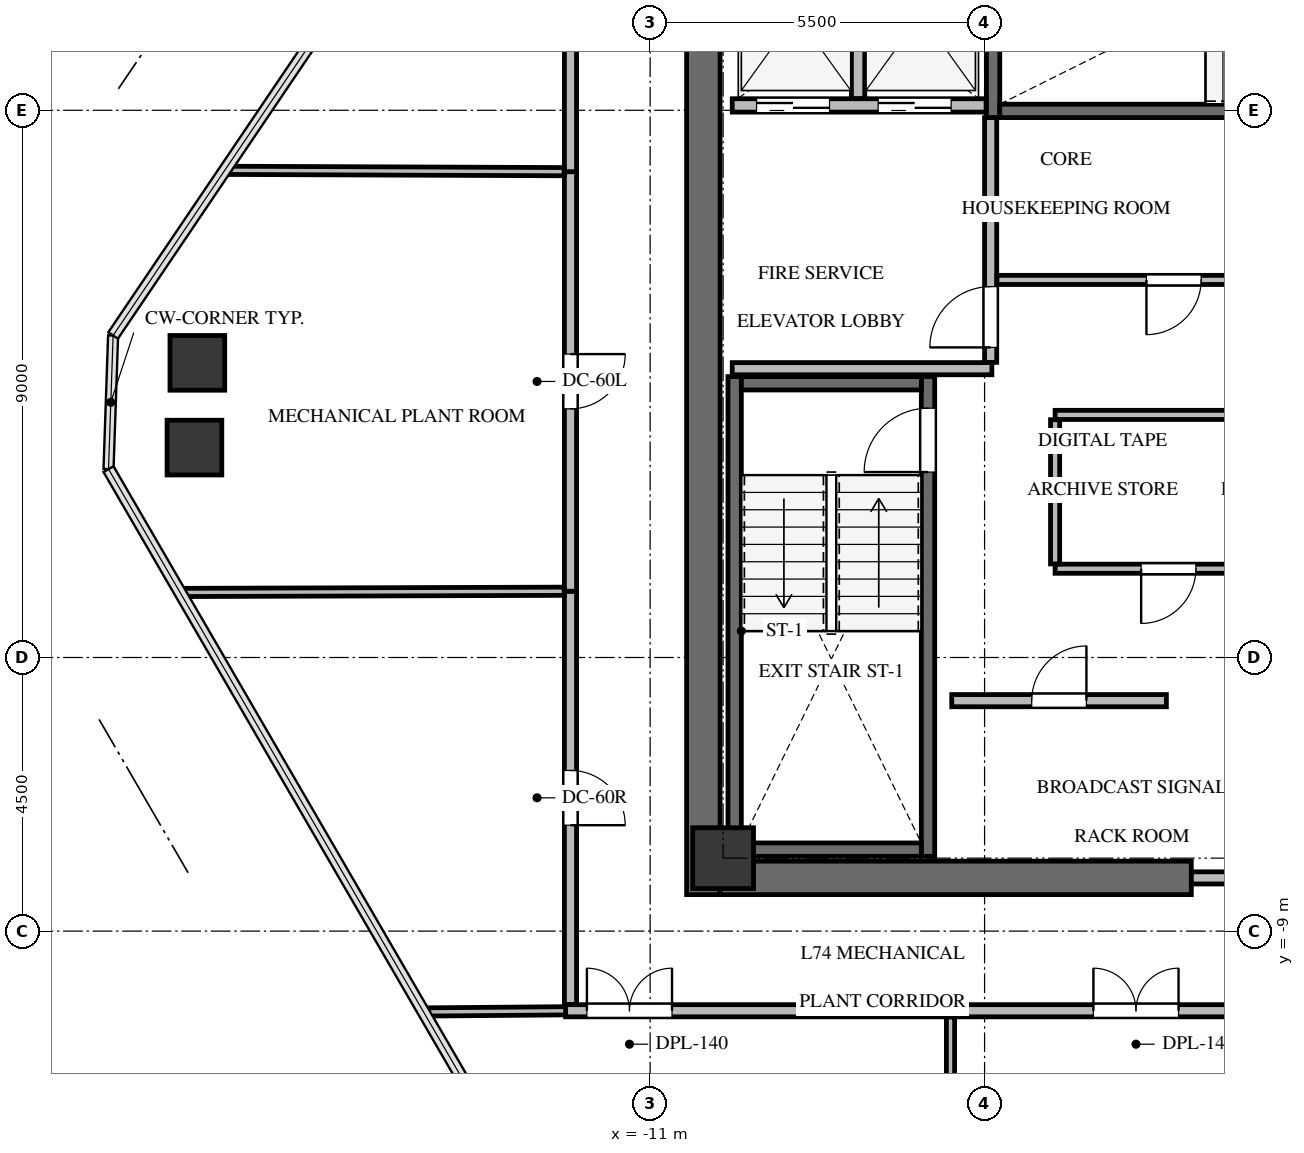
"""IFC4 building model, lengths in metres.
Left out: names, types, materials, properties, quantities, classifications, styles, units other than length and angle.
Written with IfcOpenShell. Run it as: python <this file> out.ifc"""

import sys

from ifc_helpers import new_model, si_unit, direction, frame, frame_2d, origin, origin_2d, place, context, subcontext, project, spatial, rectangle, extrude, source, transform, mapped, element, fill, save


model = new_model("IFC4")
c1 = context("Model", 3, precision=1e-05, world=origin(), true_north=direction((0.0, 1.0)))
c2 = subcontext(c1, "Body", "Model", "MODEL_VIEW")
j1 = project(units=[si_unit("LENGTHUNIT", "METRE"), si_unit("PLANEANGLEUNIT", "RADIAN")], contexts=[c1])
p1 = place(None, origin())
s1 = spatial("IfcSite", under=j1, at=p1, CompositionType="ELEMENT")
p2 = place(p1, origin())
s2 = spatial("IfcBuilding", under=s1, at=p2, CompositionType="ELEMENT")
p3 = place(p2, frame((0.0, 0.0, 264.9)))
s3 = spatial("IfcBuildingStorey", under=s2, at=p3, CompositionType="ELEMENT", Elevation=264.9)
p4 = place(p3, frame((-10.125, -8.4, 0.0), z_axis=(0.0, 0.0, 1.0), x_axis=(0.0, 1.0, 0.0)))
e1 = element("IfcWall", 1, at=p4, inside=s3, PredefinedType="SHEAR", context=c2, shape_type="SweptSolid", body=[
    extrude(rectangle(XDim=16.8, YDim=0.55, at=frame_2d((8.4, 0.0))), origin(), (0.0, 0.0, 1.0), 3.4),
])
p5 = place(p3, frame((-9.85, -8.125, 0.0), z_axis=(0.0, 0.0, 1.0), x_axis=(1.0, 0.0, 0.0)))
e2 = element("IfcWall", 2, at=p5, inside=s3, PredefinedType="SHEAR", context=c2, shape_type="SweptSolid", body=[
    extrude(rectangle(XDim=7.75, YDim=0.55, at=frame_2d((3.875, 0.0))), origin(), (0.0, 0.0, 1.0), 3.4),
])
p6 = place(p3, frame((-6.43, -7.77, -0.3), z_axis=(0.0, 0.0, 1.0), x_axis=(0.0, 1.0, 0.0)))
e3 = element("IfcWall", 3, at=p6, inside=s3, PredefinedType="SHEAR", context=c2, shape_type="SweptSolid", body=[
    extrude(rectangle(XDim=7.89, YDim=0.22, at=frame_2d((3.945, 0.0))), origin(), (0.0, 0.0, 1.0), 3.4),
])
p7 = place(p6, frame((6.32, 0.0, 0.0)))
e4 = element("IfcOpeningElement", 4, at=p7, cuts=e3, PredefinedType="OPENING", context=c2, shape_type="SweptSolid", body=[
    extrude(rectangle(XDim=1.05, YDim=2.15, at=frame_2d((0.525, 1.075))), frame((0.0, 0.12, 0.0), z_axis=(0.0, -1.0, 0.0), x_axis=(1.0, 0.0, 0.0)), (0.0, 0.0, 1.0), 0.24),
])
p8 = place(p3, frame((-9.61, 0.12, -0.3), z_axis=(0.0, 0.0, 1.0), x_axis=(0.0, -1.0, 0.0)))
e5 = element("IfcWall", 5, at=p8, inside=s3, PredefinedType="SHEAR", context=c2, shape_type="SweptSolid", body=[
    extrude(rectangle(XDim=7.89, YDim=0.22, at=frame_2d((3.945, 0.0))), origin(), (0.0, 0.0, 1.0), 3.4),
])
for number, where, z_axis, x_axis in (
    (6, (-9.5, -7.66, -0.3), (0.0, 0.0, 1.0), (1.0, 0.0, 0.0)),
    (7, (-6.54, 0.01, -0.3), (0.0, 0.0, 1.0), (-1.0, 0.0, 0.0)),
):
    element("IfcWall", number, at=place(p3, frame(where, z_axis=z_axis, x_axis=x_axis)), inside=s3, PredefinedType="SHEAR", context=c2, shape_type="SweptSolid", body=[
        extrude(rectangle(XDim=2.96, YDim=0.22, at=frame_2d((1.48, 0.0))), origin(), (0.0, 0.0, 1.0), 3.4),
    ])
p9 = place(p3, frame((-5.36, 7.78, -0.3), z_axis=(0.0, 0.0, 1.0), x_axis=(0.0, -1.0, 0.0)))
e8 = element("IfcWall", 8, at=p9, inside=s3, PredefinedType="SHEAR", context=c2, shape_type="SweptSolid", body=[
    extrude(rectangle(XDim=3.4, YDim=0.22, at=frame_2d((1.7, 0.0))), origin(), (0.0, 0.0, 1.0), 3.4),
])
p10 = place(p3, frame((-5.25, 4.49, -0.3), z_axis=(0.0, 0.0, 1.0), x_axis=(1.0, 0.0, 0.0)))
e9 = element("IfcWall", 9, at=p10, inside=s3, PredefinedType="SHEAR", context=c2, shape_type="SweptSolid", body=[
    extrude(rectangle(XDim=7.35, YDim=0.22, at=frame_2d((3.675, 0.0))), origin(), (0.0, 0.0, 1.0), 3.4),
])
p11 = place(p10, frame((5.85, 0.0, 0.0)))
e10 = element("IfcOpeningElement", 10, at=p11, cuts=e9, PredefinedType="OPENING", context=c2, shape_type="SweptSolid", body=[
    extrude(rectangle(XDim=1.05, YDim=2.15, at=frame_2d((0.525, 1.075))), frame((0.0, 0.12, 0.0), z_axis=(0.0, -1.0, 0.0), x_axis=(1.0, 0.0, 0.0)), (0.0, 0.0, 1.0), 0.24),
])
m1 = source(origin(), c2, "Body", "SweptSolid", [
    extrude(rectangle(XDim=1.0, YDim=1.0, at=origin_2d()), origin(), (0.0, 0.0, 1.0), 3.4),
])
p12 = place(p3, frame((-9.8, -7.8, -0.3), z_axis=(0.0, 0.0, 1.0), x_axis=(1.0, 0.0, 0.0)))
e11 = element("IfcColumn", 11, at=p12, inside=s3, PredefinedType="COLUMN", context=c2, shape_type="MappedRepresentation", body=[
    mapped(m1, transform((0.0, 0.0, 0.0), x_axis=(1.0, 0.0, 0.0), y_axis=(0.0, 1.0, 0.0), z_axis=(0.0, 0.0, 1.0), scale=1.0)),
])
m2 = source(origin(), c2, "Body", "SweptSolid", [
    extrude(rectangle(XDim=0.9, YDim=0.9, at=origin_2d()), origin(), (0.0, 0.0, 1.0), 3.4),
])
for number, where, z_axis, x_axis in (
    (12, (-18.494, -1.048, -0.3), (0.0, 0.0, 1.0), (1.0, 0.0, 0.0)),
    (13, (-18.446, 0.346, -0.3), (0.0, 0.0, 1.0), (1.0, 0.0, 0.0)),
):
    element("IfcColumn", number, at=place(p3, frame(where, z_axis=z_axis, x_axis=x_axis)), inside=s3, PredefinedType="COLUMN", context=c2, shape_type="MappedRepresentation", body=[
        mapped(m2, transform((0.0, 0.0, 0.0), x_axis=(1.0, 0.0, 0.0), y_axis=(0.0, 1.0, 0.0), z_axis=(0.0, 0.0, 1.0), scale=1.0)),
    ])
p13 = place(p3, frame((-2.1, -8.125, 0.0), z_axis=(0.0, 0.0, 1.0), x_axis=(1.0, 0.0, 0.0)))
e14 = element("IfcWall", 14, at=p13, inside=s3, PredefinedType="SOLIDWALL", context=c2, shape_type="SweptSolid", body=[
    extrude(rectangle(XDim=4.2, YDim=0.2, at=frame_2d((2.1, 0.0))), origin(), (0.0, 0.0, 1.0), 3.085),
])
p14 = place(p13, frame((1.2, 0.0, 0.0)))
e15 = element("IfcOpeningElement", 15, at=p14, cuts=e14, PredefinedType="OPENING", context=c2, shape_type="SweptSolid", body=[
    extrude(rectangle(XDim=1.8, YDim=2.15, at=frame_2d((0.9, 1.075))), frame((0.0, 0.11, 0.0), z_axis=(0.0, -1.0, 0.0), x_axis=(1.0, 0.0, 0.0)), (0.0, 0.0, 1.0), 0.22),
])
p15 = place(p3, frame((-9.65, 4.58, 0.0), z_axis=(0.0, 0.0, 1.0), x_axis=(1.0, 0.0, 0.0)))
e16 = element("IfcWall", 16, at=p15, inside=s3, PredefinedType="SOLIDWALL", context=c2, shape_type="SweptSolid", body=[
    extrude(rectangle(XDim=4.175, YDim=0.22, at=frame_2d((2.087, 0.0))), origin(), (0.0, 0.0, 1.0), 3.085),
])
p16 = place(p15, frame((0.4, 0.0, 0.0)))
e17 = element("IfcOpeningElement", 17, at=p16, cuts=e16, PredefinedType="OPENING", context=c2, shape_type="SweptSolid", body=[
    extrude(rectangle(XDim=1.2, YDim=2.15, at=frame_2d((0.6, 1.075))), frame((0.0, 0.12, 0.0), z_axis=(0.0, -1.0, 0.0), x_axis=(1.0, 0.0, 0.0)), (0.0, 0.0, 1.0), 0.24),
])
p17 = place(p15, frame((2.4, 0.0, 0.0)))
e18 = element("IfcOpeningElement", 18, at=p17, cuts=e16, PredefinedType="OPENING", context=c2, shape_type="SweptSolid", body=[
    extrude(rectangle(XDim=1.2, YDim=2.15, at=frame_2d((0.6, 1.075))), frame((0.0, 0.12, 0.0), z_axis=(0.0, -1.0, 0.0), x_axis=(1.0, 0.0, 0.0)), (0.0, 0.0, 1.0), 0.24),
])
p18 = place(p3, frame((-7.58, 4.694, 0.0), z_axis=(0.0, 0.0, 1.0), x_axis=(0.0, 1.0, 0.0)))
e19 = element("IfcWall", 19, at=p18, inside=s3, PredefinedType="SOLIDWALL", context=c2, shape_type="SweptSolid", body=[
    extrude(rectangle(XDim=2.906, YDim=0.22, at=frame_2d((1.453, 0.0))), origin(), (0.0, 0.0, 1.0), 3.085),
])
p19 = place(p3, frame((-9.65, 0.25, 0.0), z_axis=(0.0, 0.0, 1.0), x_axis=(1.0, 0.0, 0.0)))
e20 = element("IfcWall", 20, at=p19, inside=s3, PredefinedType="SOLIDWALL", context=c2, shape_type="SweptSolid", body=[
    extrude(rectangle(XDim=4.27, YDim=0.2, at=frame_2d((2.135, 0.0))), origin(), (0.0, 0.0, 1.0), 3.085),
])
p20 = place(p3, frame((-5.4, 0.354, 0.0), z_axis=(0.0, 0.0, 1.0), x_axis=(0.0, 1.0, 0.0)))
e21 = element("IfcWall", 21, at=p20, inside=s3, PredefinedType="SOLIDWALL", context=c2, shape_type="SweptSolid", body=[
    extrude(rectangle(XDim=4.026, YDim=0.2, at=frame_2d((2.013, 0.0))), origin(), (0.0, 0.0, 1.0), 3.085),
])
p21 = place(p20, frame((0.246, 0.0, 0.0)))
e22 = element("IfcOpeningElement", 22, at=p21, cuts=e21, PredefinedType="OPENING", context=c2, shape_type="SweptSolid", body=[
    extrude(rectangle(XDim=1.0, YDim=2.15, at=frame_2d((0.5, 1.075))), frame((0.0, 0.11, 0.0), z_axis=(0.0, -1.0, 0.0), x_axis=(1.0, 0.0, 0.0)), (0.0, 0.0, 1.0), 0.22),
])
p22 = place(p3, frame((-6.04, -5.21, 0.0), z_axis=(0.0, 0.0, 1.0), x_axis=(1.0, 0.0, 0.0)))
e23 = element("IfcWall", 23, at=p22, inside=s3, PredefinedType="SOLIDWALL", context=c2, shape_type="SweptSolid", body=[
    extrude(rectangle(XDim=3.53, YDim=0.2, at=frame_2d((1.765, 0.0))), origin(), (0.0, 0.0, 1.0), 3.085),
])
p23 = place(p22, frame((1.315, 0.0, 0.0)))
e24 = element("IfcOpeningElement", 24, at=p23, cuts=e23, PredefinedType="OPENING", context=c2, shape_type="SweptSolid", body=[
    extrude(rectangle(XDim=0.9, YDim=2.05, at=frame_2d((0.45, 1.025))), frame((0.0, 0.11, 0.0), z_axis=(0.0, -1.0, 0.0), x_axis=(1.0, 0.0, 0.0)), (0.0, 0.0, 1.0), 0.22),
])
p24 = place(p3, frame((-0.61, -3.04, 0.0), z_axis=(0.0, 0.0, 1.0), x_axis=(-1.0, 0.0, 0.0)))
e25 = element("IfcWall", 25, at=p24, inside=s3, PredefinedType="PARTITIONING", context=c2, shape_type="SweptSolid", body=[
    extrude(rectangle(XDim=3.73, YDim=0.15, at=frame_2d((1.865, 0.0))), origin(), (0.0, 0.0, 1.0), 3.085),
])
p25 = place(p24, frame((1.415, 0.0, 0.0)))
e26 = element("IfcOpeningElement", 26, at=p25, cuts=e25, PredefinedType="OPENING", context=c2, shape_type="SweptSolid", body=[
    extrude(rectangle(XDim=0.9, YDim=2.05, at=frame_2d((0.45, 1.025))), frame((0.0, 0.085, 0.0), z_axis=(0.0, -1.0, 0.0), x_axis=(1.0, 0.0, 0.0)), (0.0, 0.0, 1.0), 0.17),
])
p26 = place(p3, frame((-4.34, -0.51, 0.0), z_axis=(0.0, 0.0, 1.0), x_axis=(1.0, 0.0, 0.0)))
e27 = element("IfcWall", 27, at=p26, inside=s3, PredefinedType="PARTITIONING", context=c2, shape_type="SweptSolid", body=[
    extrude(rectangle(XDim=3.73, YDim=0.15, at=frame_2d((1.865, 0.0))), origin(), (0.0, 0.0, 1.0), 3.085),
])
p27 = place(p3, frame((-4.34, -2.961, 0.0), z_axis=(0.0, 0.0, 1.0), x_axis=(0.0, 1.0, 0.0)))
e28 = element("IfcWall", 28, at=p27, inside=s3, PredefinedType="PARTITIONING", context=c2, shape_type="SweptSolid", body=[
    extrude(rectangle(XDim=2.372, YDim=0.15, at=frame_2d((1.186, 0.0))), origin(), (0.0, 0.0, 1.0), 3.085),
])
p28 = place(p3, frame((0.52, 1.71, 0.0), z_axis=(0.0, 0.0, 1.0), x_axis=(-1.0, 0.0, 0.0)))
e29 = element("IfcWall", 29, at=p28, inside=s3, PredefinedType="PARTITIONING", context=c2, shape_type="SweptSolid", body=[
    extrude(rectangle(XDim=5.816, YDim=0.15, at=frame_2d((2.908, 0.0))), origin(), (0.0, 0.0, 1.0), 3.085),
])
p29 = place(p28, frame((2.458, 0.0, 0.0)))
e30 = element("IfcOpeningElement", 30, at=p29, cuts=e29, PredefinedType="OPENING", context=c2, shape_type="SweptSolid", body=[
    extrude(rectangle(XDim=0.9, YDim=2.05, at=frame_2d((0.45, 1.025))), frame((0.0, 0.085, 0.0), z_axis=(0.0, -1.0, 0.0), x_axis=(1.0, 0.0, 0.0)), (0.0, 0.0, 1.0), 0.17),
])
p30 = place(p3, frame((-12.39, -10.31, 0.0), z_axis=(0.0, 0.0, 1.0), x_axis=(1.0, 0.0, 0.0)))
e31 = element("IfcWall", 31, at=p30, inside=s3, PredefinedType="SOLIDWALL", context=c2, shape_type="SweptSolid", body=[
    extrude(rectangle(XDim=6.33, YDim=0.2, at=frame_2d((3.165, 0.0))), origin(), (0.0, 0.0, 1.0), 3.085),
])
p31 = place(p30, frame((0.35, 0.0, 0.0)))
e32 = element("IfcOpeningElement", 32, at=p31, cuts=e31, PredefinedType="OPENING", context=c2, shape_type="SweptSolid", body=[
    extrude(rectangle(XDim=1.4, YDim=2.15, at=frame_2d((0.7, 1.075))), frame((0.0, 0.11, 0.0), z_axis=(0.0, -1.0, 0.0), x_axis=(1.0, 0.0, 0.0)), (0.0, 0.0, 1.0), 0.22),
])
p32 = place(p3, frame((-6.06, -10.31, 0.0), z_axis=(0.0, 0.0, 1.0), x_axis=(1.0, 0.0, 0.0)))
e33 = element("IfcWall", 33, at=p32, inside=s3, PredefinedType="SOLIDWALL", context=c2, shape_type="SweptSolid", body=[
    extrude(rectangle(XDim=6.1, YDim=0.2, at=frame_2d((3.05, 0.0))), origin(), (0.0, 0.0, 1.0), 2.342),
])
p33 = place(p32, frame((2.35, 0.0, 0.0)))
e34 = element("IfcOpeningElement", 34, at=p33, cuts=e33, PredefinedType="OPENING", context=c2, shape_type="SweptSolid", body=[
    extrude(rectangle(XDim=1.4, YDim=2.15, at=frame_2d((0.7, 1.075))), frame((0.0, 0.11, 0.0), z_axis=(0.0, -1.0, 0.0), x_axis=(1.0, 0.0, 0.0)), (0.0, 0.0, 1.0), 0.22),
])
p34 = place(p3, frame((-12.31, -3.41, 0.0), z_axis=(0.0, 0.0, 1.0), x_axis=(0.0, -1.0, 0.0)))
e35 = element("IfcWall", 35, at=p34, inside=s3, PredefinedType="SOLIDWALL", context=c2, shape_type="SweptSolid", body=[
    extrude(rectangle(XDim=6.796, YDim=0.2, at=frame_2d((3.398, 0.0))), origin(), (0.0, 0.0, 1.0), 3.085),
])
p35 = place(p34, frame((2.948, 0.0, 0.0)))
e36 = element("IfcOpeningElement", 36, at=p35, cuts=e35, PredefinedType="OPENING", context=c2, shape_type="SweptSolid", body=[
    extrude(rectangle(XDim=0.9, YDim=2.05, at=frame_2d((0.45, 1.025))), frame((0.0, 0.11, 0.0), z_axis=(0.0, -1.0, 0.0), x_axis=(1.0, 0.0, 0.0)), (0.0, 0.0, 1.0), 0.22),
])
p36 = place(p3, frame((-12.31, 3.49, 0.0), z_axis=(0.0, 0.0, 1.0), x_axis=(0.0, -1.0, 0.0)))
e37 = element("IfcWall", 37, at=p36, inside=s3, PredefinedType="SOLIDWALL", context=c2, shape_type="SweptSolid", body=[
    extrude(rectangle(XDim=6.9, YDim=0.2, at=frame_2d((3.45, 0.0))), origin(), (0.0, 0.0, 1.0), 2.342),
])
p37 = place(p36, frame((3.0, 0.0, 0.0)))
e38 = element("IfcOpeningElement", 38, at=p37, cuts=e37, PredefinedType="OPENING", context=c2, shape_type="SweptSolid", body=[
    extrude(rectangle(XDim=0.9, YDim=2.05, at=frame_2d((0.45, 1.025))), frame((0.0, 0.11, 0.0), z_axis=(0.0, -1.0, 0.0), x_axis=(1.0, 0.0, 0.0)), (0.0, 0.0, 1.0), 0.22),
])
p38 = place(p3, frame((-12.31, 10.206, 0.0), z_axis=(0.0, 0.0, 1.0), x_axis=(0.0, -1.0, 0.0)))
e39 = element("IfcWall", 39, at=p38, inside=s3, PredefinedType="SOLIDWALL", context=c2, shape_type="SweptSolid", body=[
    extrude(rectangle(XDim=6.716, YDim=0.2, at=frame_2d((3.358, 0.0))), origin(), (0.0, 0.0, 1.0), 2.439),
])
p39 = place(p38, frame((2.908, 0.0, 0.0)))
e40 = element("IfcOpeningElement", 40, at=p39, cuts=e39, PredefinedType="OPENING", context=c2, shape_type="SweptSolid", body=[
    extrude(rectangle(XDim=0.9, YDim=2.05, at=frame_2d((0.45, 1.025))), frame((0.0, 0.11, 0.0), z_axis=(0.0, -1.0, 0.0), x_axis=(1.0, 0.0, 0.0)), (0.0, 0.0, 1.0), 0.22),
])
p40 = place(p3, frame((-6.06, -10.414, 0.0), z_axis=(0.0, 0.0, 1.0), x_axis=(0.0, -1.0, 0.0)))
e41 = element("IfcWall", 41, at=p40, inside=s3, PredefinedType="PARTITIONING", context=c2, shape_type="SweptSolid", body=[
    extrude(rectangle(XDim=6.772, YDim=0.135, at=frame_2d((3.386, 0.0))), origin(), (0.0, 0.0, 1.0), 2.342),
])
p41 = place(p3, frame((-14.726, -10.33, 0.0), z_axis=(0.0, 0.0, 1.0), x_axis=(0.99996592241, 0.008255544766, 0.0)))
e42 = element("IfcWall", 42, at=p41, inside=s3, PredefinedType="PARTITIONING", context=c2, shape_type="SweptSolid", body=[
    extrude(rectangle(XDim=2.336, YDim=0.135, at=frame_2d((1.168, 0.0))), origin(), (0.0, 0.0, 1.0), 2.439),
])
p42 = place(p3, frame((-18.73, -3.43, 0.0), z_axis=(0.0, 0.0, 1.0), x_axis=(0.999995099089, 0.00313078243, 0.0)))
e43 = element("IfcWall", 43, at=p42, inside=s3, PredefinedType="PARTITIONING", context=c2, shape_type="SweptSolid", body=[
    extrude(rectangle(XDim=6.316, YDim=0.135, at=frame_2d((3.158, 0.0))), origin(), (0.0, 0.0, 1.0), 2.439),
])
p43 = place(p3, frame((-17.996, 3.512, 0.0), z_axis=(0.0, 0.0, 1.0), x_axis=(0.99999225143, -0.003936632956, 0.0)))
e44 = element("IfcWall", 44, at=p43, inside=s3, PredefinedType="PARTITIONING", context=c2, shape_type="SweptSolid", body=[
    extrude(rectangle(XDim=5.582, YDim=0.135, at=frame_2d((2.791, 0.0))), origin(), (0.0, 0.0, 1.0), 2.439),
])
m3 = source(origin(), c2, "Body", "SweptSolid", [
    extrude(rectangle(XDim=1.05, YDim=2.15, at=frame_2d((0.525, 1.075))), frame((0.0, 0.025, 0.0), z_axis=(0.0, -1.0, 0.0), x_axis=(1.0, 0.0, 0.0)), (0.0, 0.0, 1.0), 0.05),
])
p44 = place(p7, origin())
e45 = element("IfcDoor", 45, at=p44, inside=s3, OperationType="SINGLE_SWING_LEFT", PredefinedType="DOOR", context=c2, shape_type="MappedRepresentation", body=[
    mapped(m3, transform((0.0, 0.0, 0.0), x_axis=(1.0, 0.0, 0.0), y_axis=(0.0, 1.0, 0.0), z_axis=(0.0, 0.0, 1.0), scale=1.0)),
])
fill(e4, e45)
m4 = source(origin(), c2, "Body", "SweptSolid", [
    extrude(rectangle(XDim=1.2, YDim=2.15, at=frame_2d((0.6, 1.075))), frame((0.0, 0.025, 0.0), z_axis=(0.0, -1.0, 0.0), x_axis=(1.0, 0.0, 0.0)), (0.0, 0.0, 1.0), 0.05),
])
p45 = place(p16, origin())
e46 = element("IfcDoor", 46, at=p45, inside=s3, OperationType="DOUBLE_DOOR_SLIDING", PredefinedType="DOOR", context=c2, shape_type="MappedRepresentation", body=[
    mapped(m4, transform((0.0, 0.0, 0.0), x_axis=(1.0, 0.0, 0.0), y_axis=(0.0, 1.0, 0.0), z_axis=(0.0, 0.0, 1.0), scale=1.0)),
])
fill(e17, e46)
p46 = place(p17, origin())
e47 = element("IfcDoor", 47, at=p46, inside=s3, OperationType="DOUBLE_DOOR_SLIDING", PredefinedType="DOOR", context=c2, shape_type="MappedRepresentation", body=[
    mapped(m4, transform((0.0, 0.0, 0.0), x_axis=(1.0, 0.0, 0.0), y_axis=(0.0, 1.0, 0.0), z_axis=(0.0, 0.0, 1.0), scale=1.0)),
])
fill(e18, e47)
m5 = source(origin(), c2, "Body", "SweptSolid", [
    extrude(rectangle(XDim=1.0, YDim=2.15, at=frame_2d((0.5, 1.075))), frame((0.0, 0.025, 0.0), z_axis=(0.0, -1.0, 0.0), x_axis=(1.0, 0.0, 0.0)), (0.0, 0.0, 1.0), 0.05),
])
p47 = place(p21, origin())
e48 = element("IfcDoor", 48, at=p47, inside=s3, OperationType="SINGLE_SWING_LEFT", PredefinedType="DOOR", context=c2, shape_type="MappedRepresentation", body=[
    mapped(m5, transform((0.0, 0.0, 0.0), x_axis=(1.0, 0.0, 0.0), y_axis=(0.0, 1.0, 0.0), z_axis=(0.0, 0.0, 1.0), scale=1.0)),
])
fill(e22, e48)
m6 = source(origin(), c2, "Body", "SweptSolid", [
    extrude(rectangle(XDim=0.9, YDim=2.05, at=frame_2d((0.45, 1.025))), frame((0.0, 0.025, 0.0), z_axis=(0.0, -1.0, 0.0), x_axis=(1.0, 0.0, 0.0)), (0.0, 0.0, 1.0), 0.05),
])
p48 = place(p23, origin())
e49 = element("IfcDoor", 49, at=p48, inside=s3, OperationType="SINGLE_SWING_RIGHT", PredefinedType="DOOR", context=c2, shape_type="MappedRepresentation", body=[
    mapped(m6, transform((0.0, 0.0, 0.0), x_axis=(1.0, 0.0, 0.0), y_axis=(0.0, 1.0, 0.0), z_axis=(0.0, 0.0, 1.0), scale=1.0)),
])
fill(e24, e49)
p49 = place(p25, origin())
e50 = element("IfcDoor", 50, at=p49, inside=s3, OperationType="SINGLE_SWING_RIGHT", PredefinedType="DOOR", context=c2, shape_type="MappedRepresentation", body=[
    mapped(m6, transform((0.0, 0.0, 0.0), x_axis=(1.0, 0.0, 0.0), y_axis=(0.0, 1.0, 0.0), z_axis=(0.0, 0.0, 1.0), scale=1.0)),
])
fill(e26, e50)
p50 = place(p29, origin())
e51 = element("IfcDoor", 51, at=p50, inside=s3, OperationType="SINGLE_SWING_RIGHT", PredefinedType="DOOR", context=c2, shape_type="MappedRepresentation", body=[
    mapped(m6, transform((0.0, 0.0, 0.0), x_axis=(1.0, 0.0, 0.0), y_axis=(0.0, 1.0, 0.0), z_axis=(0.0, 0.0, 1.0), scale=1.0)),
])
fill(e30, e51)
m7 = source(origin(), c2, "Body", "SweptSolid", [
    extrude(rectangle(XDim=1.4, YDim=2.15, at=frame_2d((0.7, 1.075))), frame((0.0, 0.025, 0.0), z_axis=(0.0, -1.0, 0.0), x_axis=(1.0, 0.0, 0.0)), (0.0, 0.0, 1.0), 0.05),
])
p51 = place(p31, origin())
e52 = element("IfcDoor", 52, at=p51, inside=s3, OperationType="DOUBLE_DOOR_SINGLE_SWING", PredefinedType="DOOR", context=c2, shape_type="MappedRepresentation", body=[
    mapped(m7, transform((0.0, 0.0, 0.0), x_axis=(1.0, 0.0, 0.0), y_axis=(0.0, 1.0, 0.0), z_axis=(0.0, 0.0, 1.0), scale=1.0)),
])
fill(e32, e52)
p52 = place(p33, origin())
e53 = element("IfcDoor", 53, at=p52, inside=s3, OperationType="DOUBLE_DOOR_SINGLE_SWING", PredefinedType="DOOR", context=c2, shape_type="MappedRepresentation", body=[
    mapped(m7, transform((0.0, 0.0, 0.0), x_axis=(1.0, 0.0, 0.0), y_axis=(0.0, 1.0, 0.0), z_axis=(0.0, 0.0, 1.0), scale=1.0)),
])
fill(e34, e53)
p53 = place(p35, origin())
e54 = element("IfcDoor", 54, at=p53, inside=s3, OperationType="SINGLE_SWING_RIGHT", PredefinedType="DOOR", context=c2, shape_type="MappedRepresentation", body=[
    mapped(m6, transform((0.0, 0.0, 0.0), x_axis=(1.0, 0.0, 0.0), y_axis=(0.0, 1.0, 0.0), z_axis=(0.0, 0.0, 1.0), scale=1.0)),
])
fill(e36, e54)
m8 = source(origin(), c2, "Body", "SweptSolid", [
    extrude(rectangle(XDim=0.9, YDim=2.05, at=frame_2d((0.45, 1.025))), frame((0.0, 0.025, 0.0), z_axis=(0.0, -1.0, 0.0), x_axis=(1.0, 0.0, 0.0)), (0.0, 0.0, 1.0), 0.05),
])
p54 = place(p37, origin())
e55 = element("IfcDoor", 55, at=p54, inside=s3, OperationType="SINGLE_SWING_LEFT", PredefinedType="DOOR", context=c2, shape_type="MappedRepresentation", body=[
    mapped(m8, transform((0.0, 0.0, 0.0), x_axis=(1.0, 0.0, 0.0), y_axis=(0.0, 1.0, 0.0), z_axis=(0.0, 0.0, 1.0), scale=1.0)),
])
fill(e38, e55)
save(model, sys.argv[1])
